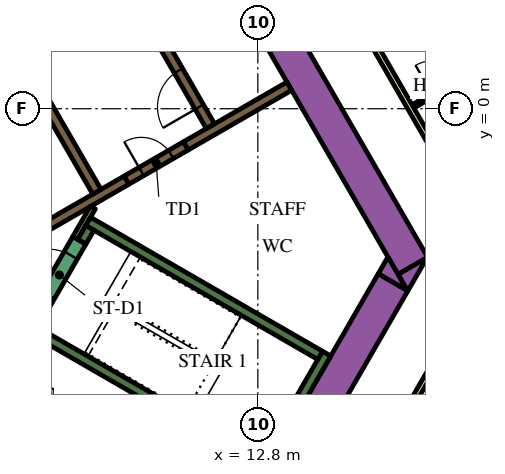
"""IFC4 building model, lengths in metres.
Left out: names, types, materials, properties, quantities, classifications, styles, units other than length and angle.
Written with IfcOpenShell. Run it as: python <this file> out.ifc"""

import sys

from ifc_helpers import new_model, si_unit, direction, frame, frame_2d, origin, place, context, subcontext, project, spatial, polyline, rectangle, outline, extrude, element, fill, save


model = new_model("IFC4")
c1 = context("Model", 3, precision=1e-05, world=origin(), true_north=direction((0.0, 1.0)))
c2 = subcontext(c1, "Body", "Model", "MODEL_VIEW")
j1 = project(units=[si_unit("LENGTHUNIT", "METRE"), si_unit("PLANEANGLEUNIT", "RADIAN")], contexts=[c1])
p1 = place(None, origin())
s1 = spatial("IfcSite", under=j1, at=p1, CompositionType="ELEMENT")
p2 = place(p1, origin())
s2 = spatial("IfcBuilding", under=s1, at=p2, CompositionType="ELEMENT")
p3 = place(p2, frame((0.0, 0.0, 107.1)))
s3 = spatial("IfcBuildingStorey", under=s2, at=p3, CompositionType="ELEMENT", Elevation=107.1)
p4 = place(p3, frame((6.711, 13.476, 0.0), z_axis=(0.0, 0.0, 1.0), x_axis=(0.500002723396, -0.866023831425, 0.0)))
e1 = element("IfcWall", 1, at=p4, inside=s3, PredefinedType="SOLIDWALL", context=c2, shape_type="SweptSolid", body=[
    extrude(rectangle(XDim=20.334, YDim=0.9, at=frame_2d((10.167, 0.0))), origin(), (0.0, 0.0, 1.0), 3.9),
])
p5 = place(p3, origin())
e2 = element("IfcWall", 2, at=p5, inside=s3, PredefinedType="SOLIDWALL", context=c2, shape_type="SweptSolid", body=[
    extrude(outline(polyline([(16.743, -4.8), (16.489, -4.36), (17.251, -3.92), (16.743, -4.8)])), origin(), (0.0, 0.0, 1.0), 3.9),
])
p6 = place(p3, frame((11.695, -12.644, 0.0), z_axis=(0.0, 0.0, 1.0), x_axis=(0.500010229568, 0.86601949766, 0.0)))
e3 = element("IfcWall", 3, at=p6, inside=s3, PredefinedType="SOLIDWALL", context=c2, shape_type="SweptSolid", body=[
    extrude(rectangle(XDim=9.326, YDim=0.9, at=frame_2d((4.663, 0.0))), origin(), (0.0, 0.0, 1.0), 3.9),
])
e4 = element("IfcWall", 4, at=p5, inside=s3, PredefinedType="SOLIDWALL", context=c2, shape_type="SweptSolid", body=[
    extrude(outline(polyline([(16.223, -3.9), (16.732, -4.78), (15.969, -4.34), (16.223, -3.9)])), origin(), (0.0, 0.0, 1.0), 3.9),
])
p7 = place(p3, frame((12.885, -9.431, 0.0), z_axis=(0.0, 0.0, 1.0), x_axis=(0.500020560727, 0.866013532718, 0.0)))
e5 = element("IfcWall", 5, at=p7, inside=s3, PredefinedType="SOLIDWALL", context=c2, shape_type="SweptSolid", body=[
    extrude(rectangle(XDim=3.45, YDim=0.25, at=frame_2d((1.725, 0.0))), origin(), (0.0, 0.0, 1.0), 3.9),
])
p8 = place(p3, frame((12.84, -9.261, 0.0), z_axis=(0.0, 0.0, 1.0), x_axis=(-0.866013990052, 0.500019768644, 0.0)))
e6 = element("IfcWall", 6, at=p8, inside=s3, PredefinedType="SOLIDWALL", context=c2, shape_type="SweptSolid", body=[
    extrude(rectangle(XDim=6.8, YDim=0.25, at=frame_2d((3.4, 0.0))), origin(), (0.0, 0.0, 1.0), 3.9),
])
p9 = place(p3, frame((8.334, -2.964, 0.0), z_axis=(0.0, 0.0, 1.0), x_axis=(0.866016039709, -0.500016218704, 0.0)))
e7 = element("IfcWall", 7, at=p9, inside=s3, PredefinedType="SOLIDWALL", context=c2, shape_type="SweptSolid", body=[
    extrude(rectangle(XDim=7.05, YDim=0.25, at=frame_2d((3.525, 0.0))), origin(), (0.0, 0.0, 1.0), 3.9),
])
p10 = place(p3, frame((8.168, -3.503, 0.0), z_axis=(0.0, 0.0, 1.0), x_axis=(0.49972245349, 0.866185586049, 0.0)))
e8 = element("IfcWall", 8, at=p10, inside=s3, PredefinedType="SOLIDWALL", context=c2, shape_type="SweptSolid", body=[
    extrude(rectangle(XDim=0.425, YDim=0.25, at=frame_2d((0.212, 0.0))), origin(), (0.0, 0.0, 1.0), 3.9),
])
p11 = place(p3, frame((13.629, 0.594, 0.0), z_axis=(0.0, 0.0, 1.0), x_axis=(-0.86602790099, -0.499995674689, 0.0)))
e9 = element("IfcWall", 9, at=p11, inside=s3, PredefinedType="SOLIDWALL", context=c2, shape_type="SweptSolid", body=[
    extrude(rectangle(XDim=3.146, YDim=0.25, at=frame_2d((1.573, 0.0))), origin(), (0.0, 0.0, 1.0), 3.9),
])
p12 = place(p3, frame((6.614, -3.456, 0.0), z_axis=(0.0, 0.0, 1.0), x_axis=(0.86602447079, 0.500001615989, 0.0)))
e10 = element("IfcWall", 10, at=p12, inside=s3, PredefinedType="SOLIDWALL", context=c2, shape_type="SweptSolid", body=[
    extrude(rectangle(XDim=3.154, YDim=0.25, at=frame_2d((1.577, 0.0))), origin(), (0.0, 0.0, 1.0), 3.9),
])
p13 = place(p3, frame((8.459, -2.599, 0.0), z_axis=(0.0, 0.0, 1.0), x_axis=(-0.500041054325, -0.866001699761, 0.0)))
e11 = element("IfcWall", 11, at=p13, inside=s3, PredefinedType="PARTITIONING", context=c2, shape_type="SweptSolid", body=[
    extrude(rectangle(XDim=0.929, YDim=0.15, at=frame_2d((0.464, 0.0))), origin(), (0.0, 0.0, 1.0), 3.9),
])
p14 = place(p3, frame((11.553, -0.46, 0.0), z_axis=(0.0, 0.0, 1.0), x_axis=(-0.500006514828, 0.866021642414, 0.0)))
e12 = element("IfcWall", 12, at=p14, inside=s3, PredefinedType="SOLIDWALL", context=c2, shape_type="SweptSolid", body=[
    extrude(rectangle(XDim=12.35, YDim=0.25, at=frame_2d((6.175, 0.0))), origin(), (0.0, 0.0, 1.0), 3.9),
])
p15 = place(p14, frame((0.585, 0.0, 0.0)))
e13 = element("IfcOpeningElement", 13, at=p15, cuts=e12, PredefinedType="OPENING", context=c2, shape_type="SweptSolid", body=[
    extrude(rectangle(XDim=1.1, YDim=2.1, at=frame_2d((0.55, 1.05))), frame((0.0, 0.135, 0.0), z_axis=(0.0, -1.0, 0.0), x_axis=(1.0, 0.0, 0.0)), (0.0, 0.0, 1.0), 0.27),
])
p16 = place(p14, frame((3.105, 0.0, 0.0)))
e14 = element("IfcOpeningElement", 14, at=p16, cuts=e12, PredefinedType="OPENING", context=c2, shape_type="SweptSolid", body=[
    extrude(rectangle(XDim=1.1, YDim=2.1, at=frame_2d((0.55, 1.05))), frame((0.0, 0.135, 0.0), z_axis=(0.0, -1.0, 0.0), x_axis=(1.0, 0.0, 0.0)), (0.0, 0.0, 1.0), 0.27),
])
p17 = place(p14, frame((5.625, 0.0, 0.0)))
e15 = element("IfcOpeningElement", 15, at=p17, cuts=e12, PredefinedType="OPENING", context=c2, shape_type="SweptSolid", body=[
    extrude(rectangle(XDim=1.1, YDim=2.1, at=frame_2d((0.55, 1.05))), frame((0.0, 0.135, 0.0), z_axis=(0.0, -1.0, 0.0), x_axis=(1.0, 0.0, 0.0)), (0.0, 0.0, 1.0), 0.27),
])
p18 = place(p3, frame((8.565, -2.185, 0.0), z_axis=(0.0, 0.0, 1.0), x_axis=(-0.499997954832, 0.866026584559, 0.0)))
e16 = element("IfcWall", 16, at=p18, inside=s3, PredefinedType="SOLIDWALL", context=c2, shape_type="SweptSolid", body=[
    extrude(rectangle(XDim=12.35, YDim=0.25, at=frame_2d((6.175, 0.0))), origin(), (0.0, 0.0, 1.0), 3.9),
])
p19 = place(p18, frame((5.725, 0.0, 0.0)))
e17 = element("IfcOpeningElement", 17, at=p19, cuts=e16, PredefinedType="OPENING", context=c2, shape_type="SweptSolid", body=[
    extrude(rectangle(XDim=0.9, YDim=2.1, at=frame_2d((0.45, 1.05))), frame((0.0, 0.135, 0.0), z_axis=(0.0, -1.0, 0.0), x_axis=(1.0, 0.0, 0.0)), (0.0, 0.0, 1.0), 0.27),
])
p20 = place(p3, frame((7.053, -5.284, 0.0), z_axis=(0.0, 0.0, 1.0), x_axis=(0.500078061341, 0.865980330357, 0.0)))
e18 = element("IfcWall", 18, at=p20, inside=s3, PredefinedType="SOLIDWALL", context=c2, shape_type="SweptSolid", body=[
    extrude(rectangle(XDim=2.1, YDim=0.4, at=frame_2d((1.05, 0.0))), origin(), (0.0, 0.0, 1.0), 3.9),
])
p21 = place(p20, frame((0.45, 0.0, 0.0)))
e19 = element("IfcOpeningElement", 19, at=p21, cuts=e18, PredefinedType="OPENING", context=c2, shape_type="SweptSolid", body=[
    extrude(rectangle(XDim=1.2, YDim=2.1, at=frame_2d((0.6, 1.05))), frame((0.0, 0.21, 0.0), z_axis=(0.0, -1.0, 0.0), x_axis=(1.0, 0.0, 0.0)), (0.0, 0.0, 1.0), 0.42),
])
p22 = place(p3, frame((9.346, -1.879, 0.0), z_axis=(0.0, 0.0, 1.0), x_axis=(0.866047807691, 0.499961193289, 0.0)))
e20 = element("IfcWall", 20, at=p22, inside=s3, PredefinedType="SOLIDWALL", context=c2, shape_type="SweptSolid", body=[
    extrude(rectangle(XDim=1.8, YDim=0.25, at=frame_2d((0.9, 0.0))), origin(), (0.0, 0.0, 1.0), 3.9),
])
p23 = place(p22, frame((0.45, 0.0, 0.0)))
e21 = element("IfcOpeningElement", 21, at=p23, cuts=e20, PredefinedType="OPENING", context=c2, shape_type="SweptSolid", body=[
    extrude(rectangle(XDim=0.9, YDim=2.1, at=frame_2d((0.45, 1.05))), frame((0.0, 0.135, 0.0), z_axis=(0.0, -1.0, 0.0), x_axis=(1.0, 0.0, 0.0)), (0.0, 0.0, 1.0), 0.27),
])
p24 = place(p3, frame((19.081, -3.9, 0.0), z_axis=(0.0, 0.0, 1.0), x_axis=(-0.499974327079, -0.866040225545, 0.0)))
e22 = element("IfcWall", 22, at=p24, inside=s3, PredefinedType="PARTITIONING", context=c2, shape_type="SweptSolid", body=[
    extrude(rectangle(XDim=5.258, YDim=0.15, at=frame_2d((2.629, 0.0))), origin(), (0.0, 0.0, 1.0), 2.75),
])
p25 = place(p24, frame((0.18, 0.0, 0.0)))
e23 = element("IfcOpeningElement", 23, at=p25, cuts=e22, PredefinedType="OPENING", context=c2, shape_type="SweptSolid", body=[
    extrude(rectangle(XDim=1.0, YDim=2.1, at=frame_2d((0.5, 1.05))), frame((0.0, 0.085, 0.0), z_axis=(0.0, -1.0, 0.0), x_axis=(1.0, 0.0, 0.0)), (0.0, 0.0, 1.0), 0.17),
])
p26 = place(p3, frame((6.163, 18.475, 0.0), z_axis=(0.0, 0.0, 1.0), x_axis=(0.500001317485, -0.866024643133, 0.0)))
e24 = element("IfcWall", 24, at=p26, inside=s3, PredefinedType="PARTITIONING", context=c2, shape_type="SweptSolid", body=[
    extrude(rectangle(XDim=25.767, YDim=0.15, at=frame_2d((12.883, 0.0))), origin(), (0.0, 0.0, 1.0), 2.75),
])
p27 = place(p26, frame((24.241, 0.0, 0.0)))
e25 = element("IfcOpeningElement", 25, at=p27, cuts=e24, PredefinedType="OPENING", context=c2, shape_type="SweptSolid", body=[
    extrude(rectangle(XDim=1.0, YDim=2.1, at=frame_2d((0.5, 1.05))), frame((0.0, 0.085, 0.0), z_axis=(0.0, -1.0, 0.0), x_axis=(1.0, 0.0, 0.0)), (0.0, 0.0, 1.0), 0.17),
])
p28 = place(p26, frame((13.144, 0.0, 0.0)))
e26 = element("IfcOpeningElement", 26, at=p28, cuts=e24, PredefinedType="OPENING", context=c2, shape_type="SweptSolid", body=[
    extrude(rectangle(XDim=1.0, YDim=2.1, at=frame_2d((0.5, 1.05))), frame((0.0, 0.085, 0.0), z_axis=(0.0, -1.0, 0.0), x_axis=(1.0, 0.0, 0.0)), (0.0, 0.0, 1.0), 0.17),
])
p29 = place(p26, frame((10.874, 0.0, 0.0)))
e27 = element("IfcOpeningElement", 27, at=p29, cuts=e24, PredefinedType="OPENING", context=c2, shape_type="SweptSolid", body=[
    extrude(rectangle(XDim=0.9, YDim=2.1, at=frame_2d((0.45, 1.05))), frame((0.0, 0.085, 0.0), z_axis=(0.0, -1.0, 0.0), x_axis=(1.0, 0.0, 0.0)), (0.0, 0.0, 1.0), 0.17),
])
p30 = place(p26, frame((3.718, 0.0, 0.0)))
e28 = element("IfcOpeningElement", 28, at=p30, cuts=e24, PredefinedType="OPENING", context=c2, shape_type="SweptSolid", body=[
    extrude(rectangle(XDim=1.0, YDim=2.1, at=frame_2d((0.5, 1.05))), frame((0.0, 0.085, 0.0), z_axis=(0.0, -1.0, 0.0), x_axis=(1.0, 0.0, 0.0)), (0.0, 0.0, 1.0), 0.17),
])
p31 = place(p26, frame((2.411, 0.0, 0.0)))
e29 = element("IfcOpeningElement", 29, at=p31, cuts=e24, PredefinedType="OPENING", context=c2, shape_type="SweptSolid", body=[
    extrude(rectangle(XDim=1.0, YDim=2.1, at=frame_2d((0.5, 1.05))), frame((0.0, 0.085, 0.0), z_axis=(0.0, -1.0, 0.0), x_axis=(1.0, 0.0, 0.0)), (0.0, 0.0, 1.0), 0.17),
])
p32 = place(p3, frame((16.881, 0.061, 0.0), z_axis=(0.0, 0.0, 1.0), x_axis=(0.866019956843, 0.50000943426, 0.0)))
e30 = element("IfcWall", 30, at=p32, inside=s3, PredefinedType="PARTITIONING", context=c2, shape_type="SweptSolid", body=[
    extrude(rectangle(XDim=2.7, YDim=0.1, at=frame_2d((1.35, 0.0))), origin(), (0.0, 0.0, 1.0), 2.75),
])
p33 = place(p32, frame((0.6, 0.0, 0.0)))
e31 = element("IfcOpeningElement", 31, at=p33, cuts=e30, PredefinedType="OPENING", context=c2, shape_type="SweptSolid", body=[
    extrude(rectangle(XDim=0.9, YDim=2.1, at=frame_2d((0.45, 1.05))), frame((0.0, 0.06, 0.0), z_axis=(0.0, -1.0, 0.0), x_axis=(1.0, 0.0, 0.0)), (0.0, 0.0, 1.0), 0.12),
])
p34 = place(p15, origin())
e32 = element("IfcDoor", 32, at=p34, inside=s3, OperationType="DOUBLE_DOOR_SLIDING", PredefinedType="DOOR", context=c2, shape_type="SweptSolid", body=[
    extrude(rectangle(XDim=1.1, YDim=2.1, at=frame_2d((0.55, 1.05))), frame((0.0, 0.025, 0.0), z_axis=(0.0, -1.0, 0.0), x_axis=(1.0, 0.0, 0.0)), (0.0, 0.0, 1.0), 0.05),
])
fill(e13, e32)
p35 = place(p21, origin())
e33 = element("IfcDoor", 33, at=p35, inside=s3, OperationType="SINGLE_SWING_LEFT", PredefinedType="DOOR", context=c2, shape_type="SweptSolid", body=[
    extrude(rectangle(XDim=1.2, YDim=2.1, at=frame_2d((0.6, 1.05))), frame((0.0, 0.025, 0.0), z_axis=(0.0, -1.0, 0.0), x_axis=(1.0, 0.0, 0.0)), (0.0, 0.0, 1.0), 0.05),
])
fill(e19, e33)
p36 = place(p23, origin())
e34 = element("IfcDoor", 34, at=p36, inside=s3, OperationType="SINGLE_SWING_LEFT", PredefinedType="DOOR", context=c2, shape_type="SweptSolid", body=[
    extrude(rectangle(XDim=0.9, YDim=2.1, at=frame_2d((0.45, 1.05))), frame((0.0, 0.025, 0.0), z_axis=(0.0, -1.0, 0.0), x_axis=(1.0, 0.0, 0.0)), (0.0, 0.0, 1.0), 0.05),
])
fill(e21, e34)
save(model, sys.argv[1])
